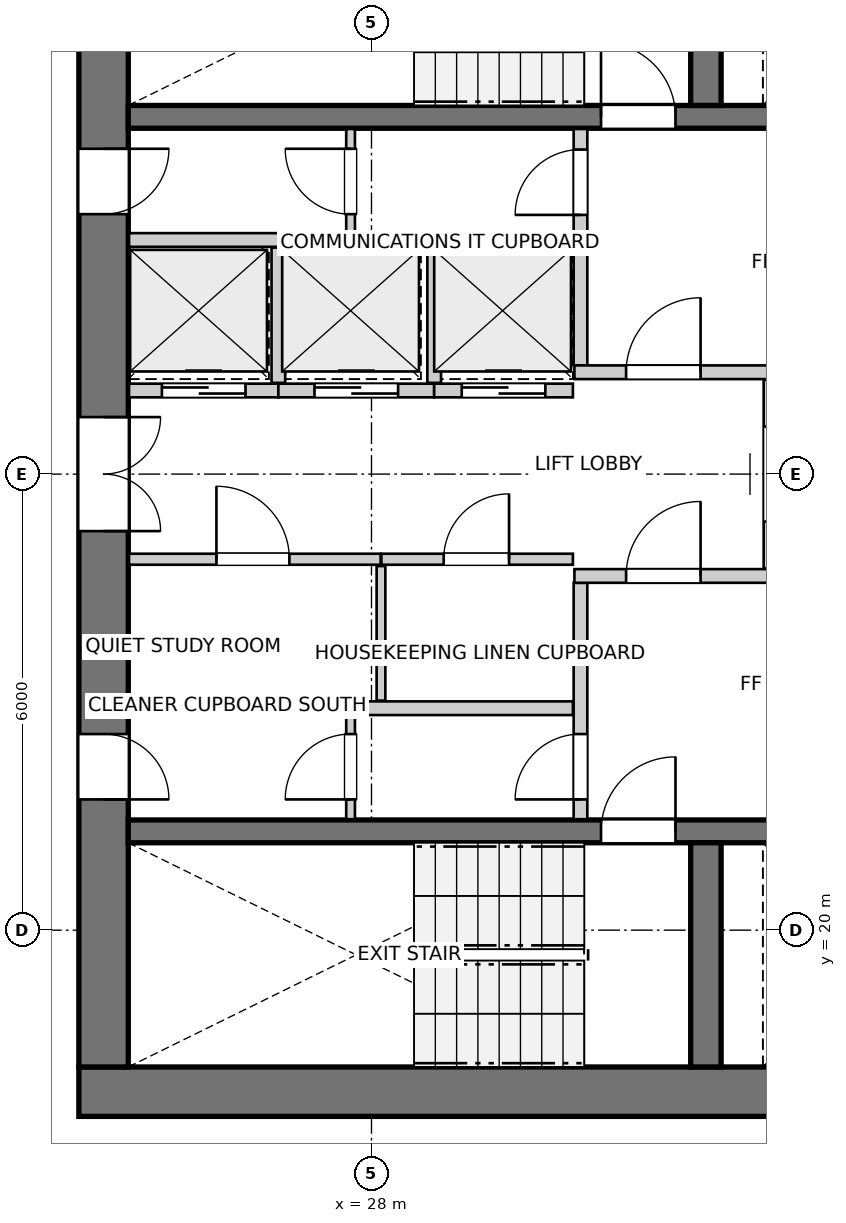
"""IFC4 building model, lengths in metres.
Left out: names, types, materials, properties, quantities, classifications, styles, units other than length and angle.
Written with IfcOpenShell. Run it as: python <this file> out.ifc"""

import sys

from ifc_helpers import new_model, si_unit, direction, frame, frame_2d, origin, place, context, subcontext, project, spatial, rectangle, extrude, source, transform, mapped, element, fill, save


model = new_model("IFC4")
c1 = context("Model", 3, precision=1e-05, world=origin(), true_north=direction((0.0, 1.0)))
c2 = subcontext(c1, "Body", "Model", "MODEL_VIEW")
j1 = project(units=[si_unit("LENGTHUNIT", "METRE"), si_unit("PLANEANGLEUNIT", "RADIAN")], contexts=[c1])
p1 = place(None, origin())
s1 = spatial("IfcSite", under=j1, at=p1, CompositionType="ELEMENT")
p2 = place(p1, origin())
s2 = spatial("IfcBuilding", under=s1, at=p2, CompositionType="ELEMENT")
p3 = place(p2, frame((0.0, 0.0, 149.0)))
s3 = spatial("IfcBuildingStorey", under=s2, at=p3, CompositionType="ELEMENT", Elevation=149.0)
p4 = place(p3, frame((24.15, 17.875, 0.0), z_axis=(0.0, 0.0, 1.0), x_axis=(1.0, 0.0, 0.0)))
e1 = element("IfcWall", 1, at=p4, inside=s3, PredefinedType="SHEAR", context=c2, shape_type="SweptSolid", body=[
    extrude(rectangle(XDim=12.4, YDim=0.65, at=frame_2d((6.2, 0.0))), origin(), (0.0, 0.0, 1.0), 2.935),
])
p5 = place(p3, frame((24.475, 33.8, 0.0), z_axis=(0.0, 0.0, 1.0), x_axis=(0.0, -1.0, 0.0)))
e2 = element("IfcWall", 2, at=p5, inside=s3, PredefinedType="SHEAR", context=c2, shape_type="SweptSolid", body=[
    extrude(rectangle(XDim=15.6, YDim=0.65, at=frame_2d((7.8, 0.0))), origin(), (0.0, 0.0, 1.0), 2.935),
])
p6 = place(p5, frame((7.05, 0.0, 0.0)))
e3 = element("IfcOpeningElement", 3, at=p6, cuts=e2, PredefinedType="OPENING", context=c2, shape_type="SweptSolid", body=[
    extrude(rectangle(XDim=1.5, YDim=2.15, at=frame_2d((0.75, 1.075))), frame((0.0, 0.335, 0.0), z_axis=(0.0, -1.0, 0.0), x_axis=(1.0, 0.0, 0.0)), (0.0, 0.0, 1.0), 0.67),
])
p7 = place(p5, frame((3.52, 0.0, 0.0)))
e4 = element("IfcOpeningElement", 4, at=p7, cuts=e2, PredefinedType="OPENING", context=c2, shape_type="SweptSolid", body=[
    extrude(rectangle(XDim=0.86, YDim=2.05, at=frame_2d((0.43, 1.025))), frame((0.0, 0.335, 0.0), z_axis=(0.0, -1.0, 0.0), x_axis=(1.0, 0.0, 0.0)), (0.0, 0.0, 1.0), 0.67),
])
p8 = place(p5, frame((11.22, 0.0, 0.0)))
e5 = element("IfcOpeningElement", 5, at=p8, cuts=e2, PredefinedType="OPENING", context=c2, shape_type="SweptSolid", body=[
    extrude(rectangle(XDim=0.86, YDim=2.05, at=frame_2d((0.43, 1.025))), frame((0.0, 0.335, 0.0), z_axis=(0.0, -1.0, 0.0), x_axis=(1.0, 0.0, 0.0)), (0.0, 0.0, 1.0), 0.67),
])
p9 = place(p3, frame((24.8, 21.3, 0.0), z_axis=(0.0, 0.0, 1.0), x_axis=(1.0, 0.0, 0.0)))
e6 = element("IfcWall", 6, at=p9, inside=s3, PredefinedType="SHEAR", context=c2, shape_type="SweptSolid", body=[
    extrude(rectangle(XDim=11.1, YDim=0.3, at=frame_2d((5.55, 0.0))), origin(), (0.0, 0.0, 1.0), 2.935),
])
p10 = place(p9, frame((6.22, 0.0, 0.0)))
e7 = element("IfcOpeningElement", 7, at=p10, cuts=e6, PredefinedType="OPENING", context=c2, shape_type="SweptSolid", body=[
    extrude(rectangle(XDim=0.98, YDim=2.15, at=frame_2d((0.49, 1.075))), frame((0.0, 0.16, 0.0), z_axis=(0.0, -1.0, 0.0), x_axis=(1.0, 0.0, 0.0)), (0.0, 0.0, 1.0), 0.32),
])
p11 = place(p9, frame((9.15, 0.0, 0.0)))
e8 = element("IfcOpeningElement", 8, at=p11, cuts=e6, PredefinedType="OPENING", context=c2, shape_type="SweptSolid", body=[
    extrude(rectangle(XDim=1.15, YDim=2.15, at=frame_2d((0.575, 1.075))), frame((0.0, 0.16, 0.0), z_axis=(0.0, -1.0, 0.0), x_axis=(1.0, 0.0, 0.0)), (0.0, 0.0, 1.0), 0.32),
])
p12 = place(p3, frame((32.4, 18.2, 0.0), z_axis=(0.0, 0.0, 1.0), x_axis=(0.0, 1.0, 0.0)))
e9 = element("IfcWall", 9, at=p12, inside=s3, PredefinedType="SHEAR", context=c2, shape_type="SweptSolid", body=[
    extrude(rectangle(XDim=2.95, YDim=0.4, at=frame_2d((1.475, 0.0))), origin(), (0.0, 0.0, 1.0), 2.935),
])
p13 = place(p3, frame((24.8, 30.7, 0.0), z_axis=(0.0, 0.0, 1.0), x_axis=(1.0, 0.0, 0.0)))
e10 = element("IfcWall", 10, at=p13, inside=s3, PredefinedType="SHEAR", context=c2, shape_type="SweptSolid", body=[
    extrude(rectangle(XDim=11.1, YDim=0.3, at=frame_2d((5.55, 0.0))), origin(), (0.0, 0.0, 1.0), 2.935),
])
p14 = place(p13, frame((6.22, 0.0, 0.0)))
e11 = element("IfcOpeningElement", 11, at=p14, cuts=e10, PredefinedType="OPENING", context=c2, shape_type="SweptSolid", body=[
    extrude(rectangle(XDim=0.98, YDim=2.15, at=frame_2d((0.49, 1.075))), frame((0.0, 0.16, 0.0), z_axis=(0.0, -1.0, 0.0), x_axis=(1.0, 0.0, 0.0)), (0.0, 0.0, 1.0), 0.32),
])
p15 = place(p13, frame((9.15, 0.0, 0.0)))
e12 = element("IfcOpeningElement", 12, at=p15, cuts=e10, PredefinedType="OPENING", context=c2, shape_type="SweptSolid", body=[
    extrude(rectangle(XDim=1.15, YDim=2.15, at=frame_2d((0.575, 1.075))), frame((0.0, 0.16, 0.0), z_axis=(0.0, -1.0, 0.0), x_axis=(1.0, 0.0, 0.0)), (0.0, 0.0, 1.0), 0.32),
])
p16 = place(p3, frame((32.4, 30.85, 0.0), z_axis=(0.0, 0.0, 1.0), x_axis=(0.0, 1.0, 0.0)))
e13 = element("IfcWall", 13, at=p16, inside=s3, PredefinedType="SHEAR", context=c2, shape_type="SweptSolid", body=[
    extrude(rectangle(XDim=2.95, YDim=0.4, at=frame_2d((1.475, 0.0))), origin(), (0.0, 0.0, 1.0), 2.935),
])
p17 = place(p3, frame((30.75, 21.46, 0.0), z_axis=(0.0, 0.0, 1.0), x_axis=(0.0, 1.0, 0.0)))
e14 = element("IfcWall", 14, at=p17, inside=s3, PredefinedType="PARTITIONING", context=c2, shape_type="SweptSolid", body=[
    extrude(rectangle(XDim=3.11, YDim=0.18, at=frame_2d((1.555, 0.0))), origin(), (0.0, 0.0, 1.0), 2.935),
])
p18 = place(p17, frame((0.26, 0.0, 0.0)))
e15 = element("IfcOpeningElement", 15, at=p18, cuts=e14, PredefinedType="OPENING", context=c2, shape_type="SweptSolid", body=[
    extrude(rectangle(XDim=0.86, YDim=2.05, at=frame_2d((0.43, 1.025))), frame((0.0, 0.1, 0.0), z_axis=(0.0, -1.0, 0.0), x_axis=(1.0, 0.0, 0.0)), (0.0, 0.0, 1.0), 0.2),
])
p19 = place(p3, frame((30.67, 24.66, 0.0), z_axis=(0.0, 0.0, 1.0), x_axis=(1.0, 0.0, 0.0)))
e16 = element("IfcWall", 16, at=p19, inside=s3, PredefinedType="PARTITIONING", context=c2, shape_type="SweptSolid", body=[
    extrude(rectangle(XDim=5.22, YDim=0.18, at=frame_2d((2.61, 0.0))), origin(), (0.0, 0.0, 1.0), 2.935),
])
p20 = place(p19, frame((0.68, 0.0, 0.0)))
e17 = element("IfcOpeningElement", 17, at=p20, cuts=e16, PredefinedType="OPENING", context=c2, shape_type="SweptSolid", body=[
    extrude(rectangle(XDim=0.98, YDim=2.15, at=frame_2d((0.49, 1.075))), frame((0.0, 0.1, 0.0), z_axis=(0.0, -1.0, 0.0), x_axis=(1.0, 0.0, 0.0)), (0.0, 0.0, 1.0), 0.2),
])
p21 = place(p3, frame((30.75, 27.43, 0.0), z_axis=(0.0, 0.0, 1.0), x_axis=(0.0, 1.0, 0.0)))
e18 = element("IfcWall", 18, at=p21, inside=s3, PredefinedType="PARTITIONING", context=c2, shape_type="SweptSolid", body=[
    extrude(rectangle(XDim=3.11, YDim=0.18, at=frame_2d((1.555, 0.0))), origin(), (0.0, 0.0, 1.0), 2.935),
])
p22 = place(p21, frame((1.98, 0.0, 0.0)))
e19 = element("IfcOpeningElement", 19, at=p22, cuts=e18, PredefinedType="OPENING", context=c2, shape_type="SweptSolid", body=[
    extrude(rectangle(XDim=0.86, YDim=2.05, at=frame_2d((0.43, 1.025))), frame((0.0, 0.1, 0.0), z_axis=(0.0, -1.0, 0.0), x_axis=(1.0, 0.0, 0.0)), (0.0, 0.0, 1.0), 0.2),
])
p23 = place(p3, frame((30.67, 27.34, 0.0), z_axis=(0.0, 0.0, 1.0), x_axis=(1.0, 0.0, 0.0)))
e20 = element("IfcWall", 20, at=p23, inside=s3, PredefinedType="PARTITIONING", context=c2, shape_type="SweptSolid", body=[
    extrude(rectangle(XDim=5.22, YDim=0.18, at=frame_2d((2.61, 0.0))), origin(), (0.0, 0.0, 1.0), 2.935),
])
p24 = place(p23, frame((0.68, 0.0, 0.0)))
e21 = element("IfcOpeningElement", 21, at=p24, cuts=e20, PredefinedType="OPENING", context=c2, shape_type="SweptSolid", body=[
    extrude(rectangle(XDim=0.98, YDim=2.15, at=frame_2d((0.49, 1.075))), frame((0.0, 0.1, 0.0), z_axis=(0.0, -1.0, 0.0), x_axis=(1.0, 0.0, 0.0)), (0.0, 0.0, 1.0), 0.2),
])
p25 = place(p3, frame((33.25, 24.76, 0.0), z_axis=(0.0, 0.0, 1.0), x_axis=(0.0, 1.0, 0.0)))
e22 = element("IfcWall", 22, at=p25, inside=s3, PredefinedType="PARTITIONING", context=c2, shape_type="SweptSolid", body=[
    extrude(rectangle(XDim=2.48, YDim=0.18, at=frame_2d((1.24, 0.0))), origin(), (0.0, 0.0, 1.0), 2.935),
])
p26 = place(p25, frame((0.615, 0.0, 0.0)))
e23 = element("IfcOpeningElement", 23, at=p26, cuts=e22, PredefinedType="OPENING", context=c2, shape_type="SweptSolid", body=[
    extrude(rectangle(XDim=1.25, YDim=2.15, at=frame_2d((0.625, 1.075))), frame((0.0, 0.1, 0.0), z_axis=(0.0, -1.0, 0.0), x_axis=(1.0, 0.0, 0.0)), (0.0, 0.0, 1.0), 0.2),
])
p27 = place(p3, frame((24.81, 22.92, 0.0), z_axis=(0.0, 0.0, 1.0), x_axis=(1.0, 0.0, 0.0)))
e24 = element("IfcWall", 24, at=p27, inside=s3, PredefinedType="PARTITIONING", context=c2, shape_type="SweptSolid", body=[
    extrude(rectangle(XDim=5.84, YDim=0.18, at=frame_2d((2.92, 0.0))), origin(), (0.0, 0.0, 1.0), 2.935),
])
p28 = place(p3, frame((24.81, 24.88, 0.0), z_axis=(0.0, 0.0, 1.0), x_axis=(1.0, 0.0, 0.0)))
e25 = element("IfcWall", 25, at=p28, inside=s3, PredefinedType="PARTITIONING", context=c2, shape_type="SweptSolid", body=[
    extrude(rectangle(XDim=3.31, YDim=0.145, at=frame_2d((1.655, 0.0))), origin(), (0.0, 0.0, 1.0), 2.935),
])
p29 = place(p28, frame((1.15, 0.0, 0.0)))
e26 = element("IfcOpeningElement", 26, at=p29, cuts=e25, PredefinedType="OPENING", context=c2, shape_type="SweptSolid", body=[
    extrude(rectangle(XDim=0.96, YDim=2.1, at=frame_2d((0.48, 1.05))), frame((0.0, 0.083, 0.0), z_axis=(0.0, -1.0, 0.0), x_axis=(1.0, 0.0, 0.0)), (0.0, 0.0, 1.0), 0.165),
])
p30 = place(p3, frame((28.13, 24.88, 0.0), z_axis=(0.0, 0.0, 1.0), x_axis=(1.0, 0.0, 0.0)))
e27 = element("IfcWall", 27, at=p30, inside=s3, PredefinedType="PARTITIONING", context=c2, shape_type="SweptSolid", body=[
    extrude(rectangle(XDim=2.52, YDim=0.145, at=frame_2d((1.26, 0.0))), origin(), (0.0, 0.0, 1.0), 2.935),
])
p31 = place(p30, frame((0.82, 0.0, 0.0)))
e28 = element("IfcOpeningElement", 28, at=p31, cuts=e27, PredefinedType="OPENING", context=c2, shape_type="SweptSolid", body=[
    extrude(rectangle(XDim=0.86, YDim=2.05, at=frame_2d((0.43, 1.025))), frame((0.0, 0.083, 0.0), z_axis=(0.0, -1.0, 0.0), x_axis=(1.0, 0.0, 0.0)), (0.0, 0.0, 1.0), 0.165),
])
p32 = place(p3, frame((28.125, 23.02, 0.0), z_axis=(0.0, 0.0, 1.0), x_axis=(0.0, 1.0, 0.0)))
e29 = element("IfcWall", 29, at=p32, inside=s3, PredefinedType="PARTITIONING", context=c2, shape_type="SweptSolid", body=[
    extrude(rectangle(XDim=1.77, YDim=0.115, at=frame_2d((0.885, 0.0))), origin(), (0.0, 0.0, 1.0), 2.935),
])
p33 = place(p3, frame((24.81, 29.08, 0.0), z_axis=(0.0, 0.0, 1.0), x_axis=(1.0, 0.0, 0.0)))
e30 = element("IfcWall", 30, at=p33, inside=s3, PredefinedType="PARTITIONING", context=c2, shape_type="SweptSolid", body=[
    extrude(rectangle(XDim=5.84, YDim=0.18, at=frame_2d((2.92, 0.0))), origin(), (0.0, 0.0, 1.0), 2.935),
])
p34 = place(p3, frame((24.81, 27.1, 0.0), z_axis=(0.0, 0.0, 1.0), x_axis=(1.0, 0.0, 0.0)))
e31 = element("IfcWall", 31, at=p34, inside=s3, PredefinedType="PARTITIONING", context=c2, shape_type="SweptSolid", body=[
    extrude(rectangle(XDim=1.965, YDim=0.18, at=frame_2d((0.982, 0.0))), origin(), (0.0, 0.0, 1.0), 2.935),
])
p35 = place(p34, frame((0.433, 0.0, 0.0)))
e32 = element("IfcOpeningElement", 32, at=p35, cuts=e31, PredefinedType="OPENING", context=c2, shape_type="SweptSolid", body=[
    extrude(rectangle(XDim=1.1, YDim=2.15, at=frame_2d((0.55, 1.075))), frame((0.0, 0.1, 0.0), z_axis=(0.0, -1.0, 0.0), x_axis=(1.0, 0.0, 0.0)), (0.0, 0.0, 1.0), 0.2),
])
p36 = place(p3, frame((26.775, 27.1, 0.0), z_axis=(0.0, 0.0, 1.0), x_axis=(1.0, 0.0, 0.0)))
e33 = element("IfcWall", 33, at=p36, inside=s3, PredefinedType="PARTITIONING", context=c2, shape_type="SweptSolid", body=[
    extrude(rectangle(XDim=2.05, YDim=0.18, at=frame_2d((1.025, 0.0))), origin(), (0.0, 0.0, 1.0), 2.935),
])
p37 = place(p36, frame((0.475, 0.0, 0.0)))
e34 = element("IfcOpeningElement", 34, at=p37, cuts=e33, PredefinedType="OPENING", context=c2, shape_type="SweptSolid", body=[
    extrude(rectangle(XDim=1.1, YDim=2.15, at=frame_2d((0.55, 1.075))), frame((0.0, 0.1, 0.0), z_axis=(0.0, -1.0, 0.0), x_axis=(1.0, 0.0, 0.0)), (0.0, 0.0, 1.0), 0.2),
])
p38 = place(p3, frame((26.775, 27.2, 0.0), z_axis=(0.0, 0.0, 1.0), x_axis=(0.0, 1.0, 0.0)))
e35 = element("IfcWall", 35, at=p38, inside=s3, PredefinedType="PARTITIONING", context=c2, shape_type="SweptSolid", body=[
    extrude(rectangle(XDim=1.78, YDim=0.18, at=frame_2d((0.89, 0.0))), origin(), (0.0, 0.0, 1.0), 2.935),
])
p39 = place(p3, frame((28.825, 27.1, 0.0), z_axis=(0.0, 0.0, 1.0), x_axis=(1.0, 0.0, 0.0)))
e36 = element("IfcWall", 36, at=p39, inside=s3, PredefinedType="PARTITIONING", context=c2, shape_type="SweptSolid", body=[
    extrude(rectangle(XDim=1.825, YDim=0.18, at=frame_2d((0.913, 0.0))), origin(), (0.0, 0.0, 1.0), 2.935),
])
p40 = place(p39, frame((0.363, 0.0, 0.0)))
e37 = element("IfcOpeningElement", 37, at=p40, cuts=e36, PredefinedType="OPENING", context=c2, shape_type="SweptSolid", body=[
    extrude(rectangle(XDim=1.1, YDim=2.15, at=frame_2d((0.55, 1.075))), frame((0.0, 0.1, 0.0), z_axis=(0.0, -1.0, 0.0), x_axis=(1.0, 0.0, 0.0)), (0.0, 0.0, 1.0), 0.2),
])
p41 = place(p3, frame((28.825, 27.2, 0.0), z_axis=(0.0, 0.0, 1.0), x_axis=(0.0, 1.0, 0.0)))
e38 = element("IfcWall", 38, at=p41, inside=s3, PredefinedType="PARTITIONING", context=c2, shape_type="SweptSolid", body=[
    extrude(rectangle(XDim=1.78, YDim=0.18, at=frame_2d((0.89, 0.0))), origin(), (0.0, 0.0, 1.0), 2.935),
])
p42 = place(p3, frame((27.725, 21.46, 0.0), z_axis=(0.0, 0.0, 1.0), x_axis=(0.0, 1.0, 0.0)))
e39 = element("IfcWall", 39, at=p42, inside=s3, PredefinedType="PARTITIONING", context=c2, shape_type="SweptSolid", body=[
    extrude(rectangle(XDim=1.38, YDim=0.115, at=frame_2d((0.69, 0.0))), origin(), (0.0, 0.0, 1.0), 2.935),
])
p43 = place(p42, frame((0.26, 0.0, 0.0)))
e40 = element("IfcOpeningElement", 40, at=p43, cuts=e39, PredefinedType="OPENING", context=c2, shape_type="SweptSolid", body=[
    extrude(rectangle(XDim=0.86, YDim=2.05, at=frame_2d((0.43, 1.025))), frame((0.0, 0.067, 0.0), z_axis=(0.0, -1.0, 0.0), x_axis=(1.0, 0.0, 0.0)), (0.0, 0.0, 1.0), 0.135),
])
p44 = place(p3, frame((27.725, 29.16, 0.0), z_axis=(0.0, 0.0, 1.0), x_axis=(0.0, 1.0, 0.0)))
e41 = element("IfcWall", 41, at=p44, inside=s3, PredefinedType="PARTITIONING", context=c2, shape_type="SweptSolid", body=[
    extrude(rectangle(XDim=1.38, YDim=0.115, at=frame_2d((0.69, 0.0))), origin(), (0.0, 0.0, 1.0), 2.935),
])
p45 = place(p44, frame((0.26, 0.0, 0.0)))
e42 = element("IfcOpeningElement", 42, at=p45, cuts=e41, PredefinedType="OPENING", context=c2, shape_type="SweptSolid", body=[
    extrude(rectangle(XDim=0.86, YDim=2.05, at=frame_2d((0.43, 1.025))), frame((0.0, 0.067, 0.0), z_axis=(0.0, -1.0, 0.0), x_axis=(1.0, 0.0, 0.0)), (0.0, 0.0, 1.0), 0.135),
])
m1 = source(origin(), c2, "Body", "SweptSolid", [
    extrude(rectangle(XDim=0.98, YDim=2.15, at=frame_2d((0.49, 1.075))), frame((0.0, 0.025, 0.0), z_axis=(0.0, -1.0, 0.0), x_axis=(1.0, 0.0, 0.0)), (0.0, 0.0, 1.0), 0.05),
])
p46 = place(p10, origin())
e43 = element("IfcDoor", 43, at=p46, inside=s3, OperationType="SINGLE_SWING_RIGHT", PredefinedType="DOOR", context=c2, shape_type="MappedRepresentation", body=[
    mapped(m1, transform((0.0, 0.0, 0.0), x_axis=(1.0, 0.0, 0.0), y_axis=(0.0, 1.0, 0.0), z_axis=(0.0, 0.0, 1.0), scale=1.0)),
])
fill(e7, e43)
p47 = place(p14, origin())
e44 = element("IfcDoor", 44, at=p47, inside=s3, OperationType="SINGLE_SWING_LEFT", PredefinedType="DOOR", context=c2, shape_type="MappedRepresentation", body=[
    mapped(m1, transform((0.0, 0.0, 0.0), x_axis=(1.0, 0.0, 0.0), y_axis=(0.0, 1.0, 0.0), z_axis=(0.0, 0.0, 1.0), scale=1.0)),
])
fill(e11, e44)
m2 = source(origin(), c2, "Body", "SweptSolid", [
    extrude(rectangle(XDim=1.5, YDim=2.15, at=frame_2d((0.75, 1.075))), frame((0.0, 0.025, 0.0), z_axis=(0.0, -1.0, 0.0), x_axis=(1.0, 0.0, 0.0)), (0.0, 0.0, 1.0), 0.05),
])
p48 = place(p6, origin())
e45 = element("IfcDoor", 45, at=p48, inside=s3, OperationType="DOUBLE_DOOR_SINGLE_SWING", PredefinedType="DOOR", context=c2, shape_type="MappedRepresentation", body=[
    mapped(m2, transform((0.0, 0.0, 0.0), x_axis=(1.0, 0.0, 0.0), y_axis=(0.0, 1.0, 0.0), z_axis=(0.0, 0.0, 1.0), scale=1.0)),
])
fill(e3, e45)
m3 = source(origin(), c2, "Body", "SweptSolid", [
    extrude(rectangle(XDim=0.86, YDim=2.05, at=frame_2d((0.43, 1.025))), frame((0.0, 0.025, 0.0), z_axis=(0.0, -1.0, 0.0), x_axis=(1.0, 0.0, 0.0)), (0.0, 0.0, 1.0), 0.05),
])
p49 = place(p7, origin())
e46 = element("IfcDoor", 46, at=p49, inside=s3, OperationType="SINGLE_SWING_LEFT", PredefinedType="DOOR", context=c2, shape_type="MappedRepresentation", body=[
    mapped(m3, transform((0.0, 0.0, 0.0), x_axis=(1.0, 0.0, 0.0), y_axis=(0.0, 1.0, 0.0), z_axis=(0.0, 0.0, 1.0), scale=1.0)),
])
fill(e4, e46)
p50 = place(p8, origin())
e47 = element("IfcDoor", 47, at=p50, inside=s3, OperationType="SINGLE_SWING_RIGHT", PredefinedType="DOOR", context=c2, shape_type="MappedRepresentation", body=[
    mapped(m3, transform((0.0, 0.0, 0.0), x_axis=(1.0, 0.0, 0.0), y_axis=(0.0, 1.0, 0.0), z_axis=(0.0, 0.0, 1.0), scale=1.0)),
])
fill(e5, e47)
p51 = place(p18, origin())
e48 = element("IfcDoor", 48, at=p51, inside=s3, OperationType="SINGLE_SWING_LEFT", PredefinedType="DOOR", context=c2, shape_type="MappedRepresentation", body=[
    mapped(m3, transform((0.0, 0.0, 0.0), x_axis=(1.0, 0.0, 0.0), y_axis=(0.0, 1.0, 0.0), z_axis=(0.0, 0.0, 1.0), scale=1.0)),
])
fill(e15, e48)
p52 = place(p20, origin())
e49 = element("IfcDoor", 49, at=p52, inside=s3, OperationType="SINGLE_SWING_RIGHT", PredefinedType="DOOR", context=c2, shape_type="MappedRepresentation", body=[
    mapped(m1, transform((0.0, 0.0, 0.0), x_axis=(1.0, 0.0, 0.0), y_axis=(0.0, 1.0, 0.0), z_axis=(0.0, 0.0, 1.0), scale=1.0)),
])
fill(e17, e49)
p53 = place(p22, origin())
e50 = element("IfcDoor", 50, at=p53, inside=s3, OperationType="SINGLE_SWING_LEFT", PredefinedType="DOOR", context=c2, shape_type="MappedRepresentation", body=[
    mapped(m3, transform((0.0, 0.0, 0.0), x_axis=(1.0, 0.0, 0.0), y_axis=(0.0, 1.0, 0.0), z_axis=(0.0, 0.0, 1.0), scale=1.0)),
])
fill(e19, e50)
p54 = place(p24, origin())
e51 = element("IfcDoor", 51, at=p54, inside=s3, OperationType="SINGLE_SWING_RIGHT", PredefinedType="DOOR", context=c2, shape_type="MappedRepresentation", body=[
    mapped(m1, transform((0.0, 0.0, 0.0), x_axis=(1.0, 0.0, 0.0), y_axis=(0.0, 1.0, 0.0), z_axis=(0.0, 0.0, 1.0), scale=1.0)),
])
fill(e21, e51)
m4 = source(origin(), c2, "Body", "SweptSolid", [
    extrude(rectangle(XDim=0.96, YDim=2.1, at=frame_2d((0.48, 1.05))), frame((0.0, 0.025, 0.0), z_axis=(0.0, -1.0, 0.0), x_axis=(1.0, 0.0, 0.0)), (0.0, 0.0, 1.0), 0.05),
])
p55 = place(p29, origin())
e52 = element("IfcDoor", 52, at=p55, inside=s3, OperationType="SINGLE_SWING_LEFT", PredefinedType="DOOR", context=c2, shape_type="MappedRepresentation", body=[
    mapped(m4, transform((0.0, 0.0, 0.0), x_axis=(1.0, 0.0, 0.0), y_axis=(0.0, 1.0, 0.0), z_axis=(0.0, 0.0, 1.0), scale=1.0)),
])
fill(e26, e52)
p56 = place(p31, origin())
e53 = element("IfcDoor", 53, at=p56, inside=s3, OperationType="SINGLE_SWING_RIGHT", PredefinedType="DOOR", context=c2, shape_type="MappedRepresentation", body=[
    mapped(m3, transform((0.0, 0.0, 0.0), x_axis=(1.0, 0.0, 0.0), y_axis=(0.0, 1.0, 0.0), z_axis=(0.0, 0.0, 1.0), scale=1.0)),
])
fill(e28, e53)
m5 = source(origin(), c2, "Body", "SweptSolid", [
    extrude(rectangle(XDim=1.1, YDim=2.15, at=frame_2d((0.55, 1.075))), frame((0.0, 0.025, 0.0), z_axis=(0.0, -1.0, 0.0), x_axis=(1.0, 0.0, 0.0)), (0.0, 0.0, 1.0), 0.05),
])
p57 = place(p35, origin())
e54 = element("IfcDoor", 54, at=p57, inside=s3, OperationType="DOUBLE_DOOR_SLIDING", PredefinedType="DOOR", context=c2, shape_type="MappedRepresentation", body=[
    mapped(m5, transform((0.0, 0.0, 0.0), x_axis=(1.0, 0.0, 0.0), y_axis=(0.0, 1.0, 0.0), z_axis=(0.0, 0.0, 1.0), scale=1.0)),
])
fill(e32, e54)
p58 = place(p37, origin())
e55 = element("IfcDoor", 55, at=p58, inside=s3, OperationType="DOUBLE_DOOR_SLIDING", PredefinedType="DOOR", context=c2, shape_type="MappedRepresentation", body=[
    mapped(m5, transform((0.0, 0.0, 0.0), x_axis=(1.0, 0.0, 0.0), y_axis=(0.0, 1.0, 0.0), z_axis=(0.0, 0.0, 1.0), scale=1.0)),
])
fill(e34, e55)
p59 = place(p40, origin())
e56 = element("IfcDoor", 56, at=p59, inside=s3, OperationType="DOUBLE_DOOR_SLIDING", PredefinedType="DOOR", context=c2, shape_type="MappedRepresentation", body=[
    mapped(m5, transform((0.0, 0.0, 0.0), x_axis=(1.0, 0.0, 0.0), y_axis=(0.0, 1.0, 0.0), z_axis=(0.0, 0.0, 1.0), scale=1.0)),
])
fill(e37, e56)
p60 = place(p43, origin())
e57 = element("IfcDoor", 57, at=p60, inside=s3, OperationType="SINGLE_SWING_LEFT", PredefinedType="DOOR", context=c2, shape_type="MappedRepresentation", body=[
    mapped(m3, transform((0.0, 0.0, 0.0), x_axis=(1.0, 0.0, 0.0), y_axis=(0.0, 1.0, 0.0), z_axis=(0.0, 0.0, 1.0), scale=1.0)),
])
fill(e40, e57)
p61 = place(p45, origin())
e58 = element("IfcDoor", 58, at=p61, inside=s3, OperationType="SINGLE_SWING_RIGHT", PredefinedType="DOOR", context=c2, shape_type="MappedRepresentation", body=[
    mapped(m3, transform((0.0, 0.0, 0.0), x_axis=(1.0, 0.0, 0.0), y_axis=(0.0, 1.0, 0.0), z_axis=(0.0, 0.0, 1.0), scale=1.0)),
])
fill(e42, e58)
save(model, sys.argv[1])
